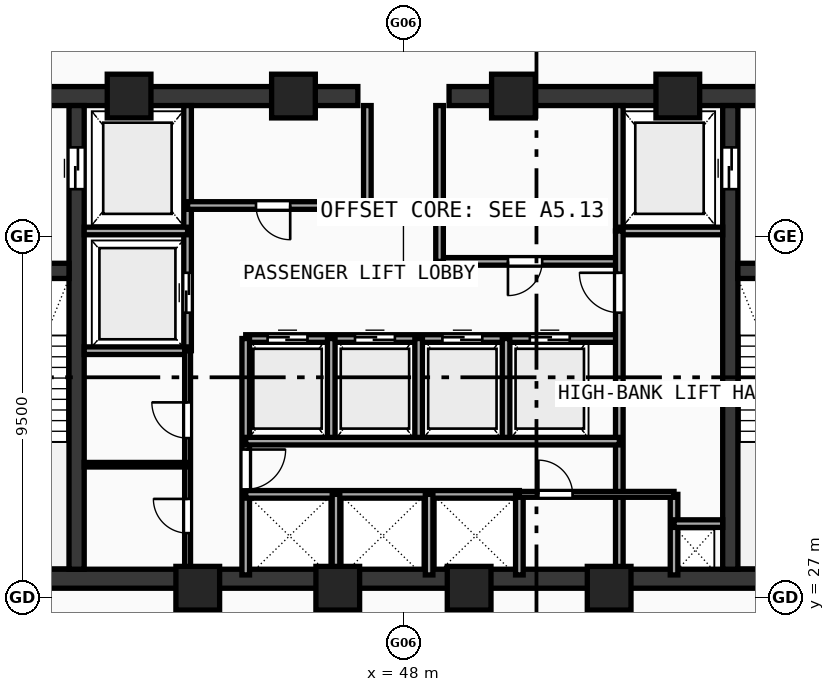
"""IFC4 building model, lengths in metres.
Left out: names, types, materials, properties, quantities, classifications, styles, units other than length and angle.
Written with IfcOpenShell. Run it as: python <this file> out.ifc"""

import sys

from ifc_helpers import new_model, si_unit, direction, frame, frame_2d, origin, origin_with_axes, origin_2d, place, context, subcontext, project, spatial, rectangle, hollow_rectangle, extrude, source, transform, mapped, element, fill, save


model = new_model("IFC4")
c1 = context("Model", 3, precision=1e-05, world=origin(), true_north=direction((0.0, 1.0)))
c2 = subcontext(c1, "Body", "Model", "MODEL_VIEW")
j1 = project(units=[si_unit("LENGTHUNIT", "METRE"), si_unit("PLANEANGLEUNIT", "RADIAN")], contexts=[c1])
p1 = place(None, origin())
s1 = spatial("IfcSite", under=j1, at=p1, CompositionType="ELEMENT")
p2 = place(p1, origin())
s2 = spatial("IfcBuilding", under=s1, at=p2, CompositionType="ELEMENT")
p3 = place(p2, frame((0.0, 0.0, 180.96)))
s3 = spatial("IfcBuildingStorey", under=s2, at=p3, CompositionType="ELEMENT", Elevation=180.96)
p4 = place(p3, frame((35.55, 27.5, 0.0), z_axis=(0.0, 0.0, 1.0), x_axis=(1.0, 0.0, 0.0)))
e1 = element("IfcWall", 1, at=p4, inside=s3, PredefinedType="SHEAR", context=c2, shape_type="SweptSolid", body=[
    extrude(rectangle(XDim=24.9, YDim=0.5, at=frame_2d((12.45, 0.0))), origin(), (0.0, 0.0, 1.0), 3.54),
])
p5 = place(p3, frame((35.55, 40.2, 0.0), z_axis=(0.0, 0.0, 1.0), x_axis=(1.0, 0.0, 0.0)))
e2 = element("IfcWall", 2, at=p5, inside=s3, PredefinedType="SHEAR", context=c2, shape_type="SweptSolid", body=[
    extrude(rectangle(XDim=11.25, YDim=0.5, at=frame_2d((5.625, 0.0))), origin(), (0.0, 0.0, 1.0), 3.54),
])
p6 = place(p5, frame((1.6, 0.0, 0.0)))
e3 = element("IfcOpeningElement", 3, at=p6, cuts=e2, PredefinedType="OPENING", context=c2, shape_type="SweptSolid", body=[
    extrude(rectangle(XDim=1.05, YDim=2.1, at=frame_2d((0.525, 1.05))), frame((0.0, 0.26, 0.0), z_axis=(0.0, -1.0, 0.0), x_axis=(1.0, 0.0, 0.0)), (0.0, 0.0, 1.0), 0.52),
])
p7 = place(p3, frame((49.2, 40.2, 0.0), z_axis=(0.0, 0.0, 1.0), x_axis=(1.0, 0.0, 0.0)))
e4 = element("IfcWall", 4, at=p7, inside=s3, PredefinedType="SHEAR", context=c2, shape_type="SweptSolid", body=[
    extrude(rectangle(XDim=11.25, YDim=0.5, at=frame_2d((5.625, 0.0))), origin(), (0.0, 0.0, 1.0), 3.54),
])
p8 = place(p7, frame((8.6, 0.0, 0.0)))
e5 = element("IfcOpeningElement", 5, at=p8, cuts=e4, PredefinedType="OPENING", context=c2, shape_type="SweptSolid", body=[
    extrude(rectangle(XDim=1.05, YDim=2.1, at=frame_2d((0.525, 1.05))), frame((0.0, 0.26, 0.0), z_axis=(0.0, -1.0, 0.0), x_axis=(1.0, 0.0, 0.0)), (0.0, 0.0, 1.0), 0.52),
])
p9 = place(p3, frame((39.4, 27.75, 0.0), z_axis=(0.0, 0.0, 1.0), x_axis=(0.0, 1.0, 0.0)))
e6 = element("IfcWall", 6, at=p9, inside=s3, PredefinedType="SHEAR", context=c2, shape_type="SweptSolid", body=[
    extrude(rectangle(XDim=12.2, YDim=0.4, at=frame_2d((6.1, 0.0))), origin(), (0.0, 0.0, 1.0), 3.54),
])
p10 = place(p9, frame((10.0, 0.0, 0.0)))
e7 = element("IfcOpeningElement", 7, at=p10, cuts=e6, PredefinedType="OPENING", context=c2, shape_type="SweptSolid", body=[
    extrude(rectangle(XDim=1.1, YDim=2.1, at=frame_2d((0.55, 1.05))), frame((0.0, 0.21, 0.0), z_axis=(0.0, -1.0, 0.0), x_axis=(1.0, 0.0, 0.0)), (0.0, 0.0, 1.0), 0.42),
])
p11 = place(p3, frame((56.6, 27.75, 0.0), z_axis=(0.0, 0.0, 1.0), x_axis=(0.0, 1.0, 0.0)))
e8 = element("IfcWall", 8, at=p11, inside=s3, PredefinedType="SHEAR", context=c2, shape_type="SweptSolid", body=[
    extrude(rectangle(XDim=12.2, YDim=0.4, at=frame_2d((6.1, 0.0))), origin(), (0.0, 0.0, 1.0), 3.54),
])
p12 = place(p11, frame((10.0, 0.0, 0.0)))
e9 = element("IfcOpeningElement", 9, at=p12, cuts=e8, PredefinedType="OPENING", context=c2, shape_type="SweptSolid", body=[
    extrude(rectangle(XDim=1.1, YDim=2.1, at=frame_2d((0.55, 1.05))), frame((0.0, 0.21, 0.0), z_axis=(0.0, -1.0, 0.0), x_axis=(1.0, 0.0, 0.0)), (0.0, 0.0, 1.0), 0.42),
])
p13 = place(p3, frame((36.05, 35.6, 0.0), z_axis=(0.0, 0.0, 1.0), x_axis=(1.0, 0.0, 0.0)))
e10 = element("IfcWall", 10, at=p13, inside=s3, PredefinedType="SHEAR", context=c2, shape_type="SweptSolid", body=[
    extrude(rectangle(XDim=3.15, YDim=0.4, at=frame_2d((1.575, 0.0))), origin(), (0.0, 0.0, 1.0), 3.54),
])
p14 = place(p13, frame((1.07, 0.0, 0.0)))
e11 = element("IfcOpeningElement", 11, at=p14, cuts=e10, PredefinedType="OPENING", context=c2, shape_type="SweptSolid", body=[
    extrude(rectangle(XDim=1.05, YDim=2.1, at=frame_2d((0.525, 1.05))), frame((0.0, 0.21, 0.0), z_axis=(0.0, -1.0, 0.0), x_axis=(1.0, 0.0, 0.0)), (0.0, 0.0, 1.0), 0.42),
])
p15 = place(p3, frame((56.8, 35.6, 0.0), z_axis=(0.0, 0.0, 1.0), x_axis=(1.0, 0.0, 0.0)))
e12 = element("IfcWall", 12, at=p15, inside=s3, PredefinedType="SHEAR", context=c2, shape_type="SweptSolid", body=[
    extrude(rectangle(XDim=3.15, YDim=0.4, at=frame_2d((1.575, 0.0))), origin(), (0.0, 0.0, 1.0), 3.54),
])
p16 = place(p15, frame((1.02, 0.0, 0.0)))
e13 = element("IfcOpeningElement", 13, at=p16, cuts=e12, PredefinedType="OPENING", context=c2, shape_type="SweptSolid", body=[
    extrude(rectangle(XDim=1.05, YDim=2.1, at=frame_2d((0.525, 1.05))), frame((0.0, 0.21, 0.0), z_axis=(0.0, -1.0, 0.0), x_axis=(1.0, 0.0, 0.0)), (0.0, 0.0, 1.0), 0.42),
])
m1 = source(origin(), c2, "Body", "SweptSolid", [
    extrude(hollow_rectangle(XDim=1.15, YDim=1.15, WallThickness=0.048, at=origin_2d()), origin(), (0.0, 0.0, 1.0), 3.8),
])
for number, where, z_axis, x_axis in (
    (14, (42.588, 27.25, -0.26), (0.0, 0.0, 1.0), (1.0, 0.0, 0.0)),
    (15, (46.272, 27.25, -0.26), (0.0, 0.0, 1.0), (1.0, 0.0, 0.0)),
    (16, (49.729, 27.25, -0.26), (0.0, 0.0, 1.0), (1.0, 0.0, 0.0)),
    (17, (53.412, 27.25, -0.26), (0.0, 0.0, 1.0), (1.0, 0.0, 0.0)),
    (18, (55.219, 40.2, -0.26), (0.0, 0.0, 1.0), (1.0, 0.0, 0.0)),
    (19, (50.894, 40.2, -0.26), (0.0, 0.0, 1.0), (1.0, 0.0, 0.0)),
    (20, (45.106, 40.2, -0.26), (0.0, 0.0, 1.0), (1.0, 0.0, 0.0)),
    (21, (40.781, 40.2, -0.26), (0.0, 0.0, 1.0), (1.0, 0.0, 0.0)),
):
    element("IfcColumn", number, at=place(p3, frame(where, z_axis=z_axis, x_axis=x_axis)), inside=s3, PredefinedType="COLUMN", context=c2, shape_type="MappedRepresentation", body=[
        mapped(m1, transform((0.0, 0.0, 0.0), scale=1.0)),
    ])
p17 = place(p3, frame((42.32, 33.5, 0.0), z_axis=(0.0, 0.0, 1.0), x_axis=(0.0, 1.0, 0.0)))
e22 = element("IfcWall", 22, at=p17, inside=s3, PredefinedType="SOLIDWALL", context=c2, shape_type="SweptSolid", body=[
    extrude(rectangle(XDim=6.45, YDim=0.2, at=frame_2d((3.225, 0.0))), origin(), (0.0, 0.0, 1.0), 3.54),
])
p18 = place(p17, frame((1.0, 0.0, 0.0)))
e23 = element("IfcOpeningElement", 23, at=p18, cuts=e22, PredefinedType="OPENING", context=c2, shape_type="SweptSolid", body=[
    extrude(rectangle(XDim=1.05, YDim=2.1, at=frame_2d((0.525, 1.05))), frame((0.0, 0.11, 0.0), z_axis=(0.0, -1.0, 0.0), x_axis=(1.0, 0.0, 0.0)), (0.0, 0.0, 1.0), 0.22),
])
for number, where, z_axis, x_axis in (
    (24, (39.6, 36.65, 0.0), (0.0, 0.0, 1.0), (1.0, 0.0, 0.0)),
    (25, (39.6, 33.5, 0.0), (0.0, 0.0, 1.0), (1.0, 0.0, 0.0)),
):
    element("IfcWall", number, at=place(p3, frame(where, z_axis=z_axis, x_axis=x_axis)), inside=s3, PredefinedType="SOLIDWALL", context=c2, shape_type="SweptSolid", body=[
        extrude(rectangle(XDim=2.72, YDim=0.2, at=frame_2d((1.36, 0.0))), origin(), (0.0, 0.0, 1.0), 3.54),
    ])
p19 = place(p3, frame((53.68, 36.65, 0.0), z_axis=(0.0, 0.0, 1.0), x_axis=(0.0, 1.0, 0.0)))
e26 = element("IfcWall", 26, at=p19, inside=s3, PredefinedType="SOLIDWALL", context=c2, shape_type="SweptSolid", body=[
    extrude(rectangle(XDim=3.3, YDim=0.2, at=frame_2d((1.65, 0.0))), origin(), (0.0, 0.0, 1.0), 3.54),
])
p20 = place(p3, frame((53.68, 36.65, 0.0), z_axis=(0.0, 0.0, 1.0), x_axis=(1.0, 0.0, 0.0)))
e27 = element("IfcWall", 27, at=p20, inside=s3, PredefinedType="SOLIDWALL", context=c2, shape_type="SweptSolid", body=[
    extrude(rectangle(XDim=2.72, YDim=0.2, at=frame_2d((1.36, 0.0))), origin(), (0.0, 0.0, 1.0), 3.54),
])
p21 = place(p3, frame((42.32, 37.32, 0.0), z_axis=(0.0, 0.0, 1.0), x_axis=(1.0, 0.0, 0.0)))
e28 = element("IfcWall", 28, at=p21, inside=s3, PredefinedType="SOLIDWALL", context=c2, shape_type="SweptSolid", body=[
    extrude(rectangle(XDim=4.73, YDim=0.2, at=frame_2d((2.365, 0.0))), origin(), (0.0, 0.0, 1.0), 3.54),
])
p22 = place(p21, frame((1.8, 0.0, 0.0)))
e29 = element("IfcOpeningElement", 29, at=p22, cuts=e28, PredefinedType="OPENING", context=c2, shape_type="SweptSolid", body=[
    extrude(rectangle(XDim=0.9, YDim=2.1, at=frame_2d((0.45, 1.05))), frame((0.0, 0.11, 0.0), z_axis=(0.0, -1.0, 0.0), x_axis=(1.0, 0.0, 0.0)), (0.0, 0.0, 1.0), 0.22),
])
p23 = place(p3, frame((48.95, 35.85, 0.0), z_axis=(0.0, 0.0, 1.0), x_axis=(1.0, 0.0, 0.0)))
e30 = element("IfcWall", 30, at=p23, inside=s3, PredefinedType="SOLIDWALL", context=c2, shape_type="SweptSolid", body=[
    extrude(rectangle(XDim=4.73, YDim=0.2, at=frame_2d((2.365, 0.0))), origin(), (0.0, 0.0, 1.0), 3.54),
])
p24 = place(p23, frame((1.8, 0.0, 0.0)))
e31 = element("IfcOpeningElement", 31, at=p24, cuts=e30, PredefinedType="OPENING", context=c2, shape_type="SweptSolid", body=[
    extrude(rectangle(XDim=0.9, YDim=2.1, at=frame_2d((0.45, 1.05))), frame((0.0, 0.11, 0.0), z_axis=(0.0, -1.0, 0.0), x_axis=(1.0, 0.0, 0.0)), (0.0, 0.0, 1.0), 0.22),
])
p25 = place(p3, frame((47.05, 37.32, 0.0), z_axis=(0.0, 0.0, 1.0), x_axis=(0.0, 1.0, 0.0)))
e32 = element("IfcWall", 32, at=p25, inside=s3, PredefinedType="SOLIDWALL", context=c2, shape_type="SweptSolid", body=[
    extrude(rectangle(XDim=2.63, YDim=0.2, at=frame_2d((1.315, 0.0))), origin(), (0.0, 0.0, 1.0), 3.54),
])
p26 = place(p3, frame((48.95, 35.85, 0.0), z_axis=(0.0, 0.0, 1.0), x_axis=(0.0, 1.0, 0.0)))
e33 = element("IfcWall", 33, at=p26, inside=s3, PredefinedType="SOLIDWALL", context=c2, shape_type="SweptSolid", body=[
    extrude(rectangle(XDim=4.1, YDim=0.2, at=frame_2d((2.05, 0.0))), origin(), (0.0, 0.0, 1.0), 3.54),
])
p27 = place(p3, frame((43.85, 33.82, 0.0), z_axis=(0.0, 0.0, 1.0), x_axis=(1.0, 0.0, 0.0)))
e34 = element("IfcWall", 34, at=p27, inside=s3, PredefinedType="SOLIDWALL", context=c2, shape_type="SweptSolid", body=[
    extrude(rectangle(XDim=9.83, YDim=0.2, at=frame_2d((4.915, 0.0))), origin(), (0.0, 0.0, 1.0), 3.54),
])
p28 = place(p27, frame((0.575, 0.0, 0.0)))
e35 = element("IfcOpeningElement", 35, at=p28, cuts=e34, PredefinedType="OPENING", context=c2, shape_type="SweptSolid", body=[
    extrude(rectangle(XDim=1.05, YDim=2.1, at=frame_2d((0.525, 1.05))), frame((0.0, 0.11, 0.0), z_axis=(0.0, -1.0, 0.0), x_axis=(1.0, 0.0, 0.0)), (0.0, 0.0, 1.0), 0.22),
])
p29 = place(p27, frame((2.875, 0.0, 0.0)))
e36 = element("IfcOpeningElement", 36, at=p29, cuts=e34, PredefinedType="OPENING", context=c2, shape_type="SweptSolid", body=[
    extrude(rectangle(XDim=1.05, YDim=2.1, at=frame_2d((0.525, 1.05))), frame((0.0, 0.11, 0.0), z_axis=(0.0, -1.0, 0.0), x_axis=(1.0, 0.0, 0.0)), (0.0, 0.0, 1.0), 0.22),
])
p30 = place(p27, frame((5.175, 0.0, 0.0)))
e37 = element("IfcOpeningElement", 37, at=p30, cuts=e34, PredefinedType="OPENING", context=c2, shape_type="SweptSolid", body=[
    extrude(rectangle(XDim=1.05, YDim=2.1, at=frame_2d((0.525, 1.05))), frame((0.0, 0.11, 0.0), z_axis=(0.0, -1.0, 0.0), x_axis=(1.0, 0.0, 0.0)), (0.0, 0.0, 1.0), 0.22),
])
p31 = place(p27, frame((7.475, 0.0, 0.0)))
e38 = element("IfcOpeningElement", 38, at=p31, cuts=e34, PredefinedType="OPENING", context=c2, shape_type="SweptSolid", body=[
    extrude(rectangle(XDim=1.05, YDim=2.1, at=frame_2d((0.525, 1.05))), frame((0.0, 0.11, 0.0), z_axis=(0.0, -1.0, 0.0), x_axis=(1.0, 0.0, 0.0)), (0.0, 0.0, 1.0), 0.22),
])
p32 = place(p3, frame((43.85, 27.6, 0.0), z_axis=(0.0, 0.0, 1.0), x_axis=(0.0, 1.0, 0.0)))
e39 = element("IfcWall", 39, at=p32, inside=s3, PredefinedType="SOLIDWALL", context=c2, shape_type="SweptSolid", body=[
    extrude(rectangle(XDim=6.22, YDim=0.2, at=frame_2d((3.11, 0.0))), origin(), (0.0, 0.0, 1.0), 3.54),
])
p33 = place(p32, frame((2.25, 0.0, 0.0)))
e40 = element("IfcOpeningElement", 40, at=p33, cuts=e39, PredefinedType="OPENING", context=c2, shape_type="SweptSolid", body=[
    extrude(rectangle(XDim=1.05, YDim=2.1, at=frame_2d((0.525, 1.05))), frame((0.0, 0.11, 0.0), z_axis=(0.0, -1.0, 0.0), x_axis=(1.0, 0.0, 0.0)), (0.0, 0.0, 1.0), 0.22),
])
p34 = place(p3, frame((53.68, 27.6, 0.0), z_axis=(0.0, 0.0, 1.0), x_axis=(0.0, 1.0, 0.0)))
e41 = element("IfcWall", 41, at=p34, inside=s3, PredefinedType="SOLIDWALL", context=c2, shape_type="SweptSolid", body=[
    extrude(rectangle(XDim=9.05, YDim=0.2, at=frame_2d((4.525, 0.0))), origin(), (0.0, 0.0, 1.0), 3.54),
])
p35 = place(p34, frame((6.9, 0.0, 0.0)))
e42 = element("IfcOpeningElement", 42, at=p35, cuts=e41, PredefinedType="OPENING", context=c2, shape_type="SweptSolid", body=[
    extrude(rectangle(XDim=1.05, YDim=2.1, at=frame_2d((0.525, 1.05))), frame((0.0, 0.11, 0.0), z_axis=(0.0, -1.0, 0.0), x_axis=(1.0, 0.0, 0.0)), (0.0, 0.0, 1.0), 0.22),
])
for number, where, z_axis, x_axis in (
    (43, (46.1, 31.12, 0.0), (0.0, 0.0, 1.0), (0.0, 1.0, 0.0)),
    (44, (48.4, 31.12, 0.0), (0.0, 0.0, 1.0), (0.0, 1.0, 0.0)),
    (45, (50.7, 31.12, 0.0), (0.0, 0.0, 1.0), (0.0, 1.0, 0.0)),
):
    element("IfcWall", number, at=place(p3, frame(where, z_axis=z_axis, x_axis=x_axis)), inside=s3, PredefinedType="SOLIDWALL", context=c2, shape_type="SweptSolid", body=[
        extrude(rectangle(XDim=2.7, YDim=0.2, at=frame_2d((1.35, 0.0))), origin(), (0.0, 0.0, 1.0), 3.54),
    ])
p36 = place(p3, frame((43.85, 29.72, 0.0), z_axis=(0.0, 0.0, 1.0), x_axis=(1.0, 0.0, 0.0)))
e46 = element("IfcWall", 46, at=p36, inside=s3, PredefinedType="SOLIDWALL", context=c2, shape_type="SweptSolid", body=[
    extrude(rectangle(XDim=7.2, YDim=0.2, at=frame_2d((3.6, 0.0))), origin(), (0.0, 0.0, 1.0), 3.54),
])
p37 = place(p3, frame((51.05, 27.6, 0.0), z_axis=(0.0, 0.0, 1.0), x_axis=(0.0, 1.0, 0.0)))
e47 = element("IfcWall", 47, at=p37, inside=s3, PredefinedType="SOLIDWALL", context=c2, shape_type="SweptSolid", body=[
    extrude(rectangle(XDim=2.12, YDim=0.2, at=frame_2d((1.06, 0.0))), origin(), (0.0, 0.0, 1.0), 3.54),
])
p38 = place(p3, frame((43.85, 31.12, 0.0), z_axis=(0.0, 0.0, 1.0), x_axis=(1.0, 0.0, 0.0)))
e48 = element("IfcWall", 48, at=p38, inside=s3, PredefinedType="SOLIDWALL", context=c2, shape_type="SweptSolid", body=[
    extrude(rectangle(XDim=9.83, YDim=0.2, at=frame_2d((4.915, 0.0))), origin(), (0.0, 0.0, 1.0), 3.54),
])
for number, where, z_axis, x_axis in (
    (49, (46.225, 27.6, 0.0), (0.0, 0.0, 1.0), (0.0, 1.0, 0.0)),
    (50, (48.675, 27.6, 0.0), (0.0, 0.0, 1.0), (0.0, 1.0, 0.0)),
    (51, (55.12, 27.6, 0.0), (0.0, 0.0, 1.0), (0.0, 1.0, 0.0)),
):
    element("IfcWall", number, at=place(p3, frame(where, z_axis=z_axis, x_axis=x_axis)), inside=s3, PredefinedType="SOLIDWALL", context=c2, shape_type="SweptSolid", body=[
        extrude(rectangle(XDim=2.12, YDim=0.2, at=frame_2d((1.06, 0.0))), origin(), (0.0, 0.0, 1.0), 3.54),
    ])
p39 = place(p3, frame((55.12, 28.95, 0.0), z_axis=(0.0, 0.0, 1.0), x_axis=(1.0, 0.0, 0.0)))
e52 = element("IfcWall", 52, at=p39, inside=s3, PredefinedType="SOLIDWALL", context=c2, shape_type="SweptSolid", body=[
    extrude(rectangle(XDim=1.28, YDim=0.2, at=frame_2d((0.64, 0.0))), origin(), (0.0, 0.0, 1.0), 3.54),
])
p40 = place(p3, frame((42.32, 27.6, 0.0), z_axis=(0.0, 0.0, 1.0), x_axis=(0.0, 1.0, 0.0)))
e53 = element("IfcWall", 53, at=p40, inside=s3, PredefinedType="PARTITIONING", context=c2, shape_type="SweptSolid", body=[
    extrude(rectangle(XDim=5.9, YDim=0.155, at=frame_2d((2.95, 0.0))), origin(), (0.0, 0.0, 1.0), 3.54),
])
p41 = place(p40, frame((1.1, 0.0, 0.0)))
e54 = element("IfcOpeningElement", 54, at=p41, cuts=e53, PredefinedType="OPENING", context=c2, shape_type="SweptSolid", body=[
    extrude(rectangle(XDim=0.9, YDim=2.1, at=frame_2d((0.45, 1.05))), frame((0.0, 0.087, 0.0), z_axis=(0.0, -1.0, 0.0), x_axis=(1.0, 0.0, 0.0)), (0.0, 0.0, 1.0), 0.175),
])
p42 = place(p40, frame((3.6, 0.0, 0.0)))
e55 = element("IfcOpeningElement", 55, at=p42, cuts=e53, PredefinedType="OPENING", context=c2, shape_type="SweptSolid", body=[
    extrude(rectangle(XDim=0.94, YDim=2.1, at=frame_2d((0.47, 1.05))), frame((0.0, 0.087, 0.0), z_axis=(0.0, -1.0, 0.0), x_axis=(1.0, 0.0, 0.0)), (0.0, 0.0, 1.0), 0.175),
])
p43 = place(p3, frame((51.05, 29.72, 0.0), z_axis=(0.0, 0.0, 1.0), x_axis=(1.0, 0.0, 0.0)))
e56 = element("IfcWall", 56, at=p43, inside=s3, PredefinedType="PARTITIONING", context=c2, shape_type="SweptSolid", body=[
    extrude(rectangle(XDim=4.07, YDim=0.155, at=frame_2d((2.035, 0.0))), origin(), (0.0, 0.0, 1.0), 3.54),
])
p44 = place(p43, frame((0.5, 0.0, 0.0)))
e57 = element("IfcOpeningElement", 57, at=p44, cuts=e56, PredefinedType="OPENING", context=c2, shape_type="SweptSolid", body=[
    extrude(rectangle(XDim=0.9, YDim=2.1, at=frame_2d((0.45, 1.05))), frame((0.0, 0.087, 0.0), z_axis=(0.0, -1.0, 0.0), x_axis=(1.0, 0.0, 0.0)), (0.0, 0.0, 1.0), 0.175),
])
p45 = place(p3, frame((39.6, 30.5, 0.0), z_axis=(0.0, 0.0, 1.0), x_axis=(1.0, 0.0, 0.0)))
e58 = element("IfcWall", 58, at=p45, inside=s3, PredefinedType="PARTITIONING", context=c2, shape_type="SweptSolid", body=[
    extrude(rectangle(XDim=2.72, YDim=0.12, at=frame_2d((1.36, 0.0))), origin(), (0.0, 0.0, 1.0), 3.54),
])
m2 = source(origin(), c2, "Body", "SweptSolid", [
    extrude(rectangle(XDim=1.1, YDim=2.1, at=frame_2d((0.55, 1.05))), frame((0.0, 0.025, 0.0), z_axis=(0.0, -1.0, 0.0), x_axis=(1.0, 0.0, 0.0)), (0.0, 0.0, 1.0), 0.05),
])
p46 = place(p10, frame((1.1, 0.0, 0.0), z_axis=(0.0, 0.0, 1.0), x_axis=(-1.0, 0.0, 0.0)))
e59 = element("IfcDoor", 59, at=p46, inside=s3, OperationType="DOUBLE_DOOR_SLIDING", PredefinedType="DOOR", context=c2, shape_type="MappedRepresentation", body=[
    mapped(m2, transform((0.0, 0.0, 0.0), scale=1.0)),
])
fill(e7, e59)
p47 = place(p12, origin_with_axes())
e60 = element("IfcDoor", 60, at=p47, inside=s3, OperationType="DOUBLE_DOOR_SLIDING", PredefinedType="DOOR", context=c2, shape_type="MappedRepresentation", body=[
    mapped(m2, transform((0.0, 0.0, 0.0), scale=1.0)),
])
fill(e9, e60)
m3 = source(origin(), c2, "Body", "SweptSolid", [
    extrude(rectangle(XDim=1.05, YDim=2.1, at=frame_2d((0.525, 1.05))), frame((0.0, 0.025, 0.0), z_axis=(0.0, -1.0, 0.0), x_axis=(1.0, 0.0, 0.0)), (0.0, 0.0, 1.0), 0.05),
])
p48 = place(p18, origin_with_axes())
e61 = element("IfcDoor", 61, at=p48, inside=s3, OperationType="DOUBLE_DOOR_SLIDING", PredefinedType="DOOR", context=c2, shape_type="MappedRepresentation", body=[
    mapped(m3, transform((0.0, 0.0, 0.0), scale=1.0)),
])
fill(e23, e61)
m4 = source(origin(), c2, "Body", "SweptSolid", [
    extrude(rectangle(XDim=0.9, YDim=2.1, at=frame_2d((0.45, 1.05))), frame((0.0, 0.025, 0.0), z_axis=(0.0, -1.0, 0.0), x_axis=(1.0, 0.0, 0.0)), (0.0, 0.0, 1.0), 0.05),
])
p49 = place(p22, frame((0.9, 0.0, 0.0), z_axis=(0.0, 0.0, 1.0), x_axis=(-1.0, 0.0, 0.0)))
e62 = element("IfcDoor", 62, at=p49, inside=s3, OperationType="SINGLE_SWING_LEFT", PredefinedType="DOOR", context=c2, shape_type="MappedRepresentation", body=[
    mapped(m4, transform((0.0, 0.0, 0.0), scale=1.0)),
])
fill(e29, e62)
p50 = place(p24, frame((0.9, 0.0, 0.0), z_axis=(0.0, 0.0, 1.0), x_axis=(-1.0, 0.0, 0.0)))
e63 = element("IfcDoor", 63, at=p50, inside=s3, OperationType="SINGLE_SWING_RIGHT", PredefinedType="DOOR", context=c2, shape_type="MappedRepresentation", body=[
    mapped(m4, transform((0.0, 0.0, 0.0), scale=1.0)),
])
fill(e31, e63)
p51 = place(p28, origin_with_axes())
e64 = element("IfcDoor", 64, at=p51, inside=s3, OperationType="DOUBLE_DOOR_SLIDING", PredefinedType="DOOR", context=c2, shape_type="MappedRepresentation", body=[
    mapped(m3, transform((0.0, 0.0, 0.0), scale=1.0)),
])
fill(e35, e64)
p52 = place(p29, origin_with_axes())
e65 = element("IfcDoor", 65, at=p52, inside=s3, OperationType="DOUBLE_DOOR_SLIDING", PredefinedType="DOOR", context=c2, shape_type="MappedRepresentation", body=[
    mapped(m3, transform((0.0, 0.0, 0.0), scale=1.0)),
])
fill(e36, e65)
p53 = place(p30, origin_with_axes())
e66 = element("IfcDoor", 66, at=p53, inside=s3, OperationType="DOUBLE_DOOR_SLIDING", PredefinedType="DOOR", context=c2, shape_type="MappedRepresentation", body=[
    mapped(m3, transform((0.0, 0.0, 0.0), scale=1.0)),
])
fill(e37, e66)
p54 = place(p31, origin_with_axes())
e67 = element("IfcDoor", 67, at=p54, inside=s3, OperationType="DOUBLE_DOOR_SLIDING", PredefinedType="DOOR", context=c2, shape_type="MappedRepresentation", body=[
    mapped(m3, transform((0.0, 0.0, 0.0), scale=1.0)),
])
fill(e38, e67)
p55 = place(p33, frame((1.05, 0.0, 0.0), z_axis=(0.0, 0.0, 1.0), x_axis=(-1.0, 0.0, 0.0)))
e68 = element("IfcDoor", 68, at=p55, inside=s3, OperationType="SINGLE_SWING_LEFT", PredefinedType="DOOR", context=c2, shape_type="MappedRepresentation", body=[
    mapped(m3, transform((0.0, 0.0, 0.0), scale=1.0)),
])
fill(e40, e68)
p56 = place(p35, origin_with_axes())
e69 = element("IfcDoor", 69, at=p56, inside=s3, OperationType="SINGLE_SWING_RIGHT", PredefinedType="DOOR", context=c2, shape_type="MappedRepresentation", body=[
    mapped(m3, transform((0.0, 0.0, 0.0), scale=1.0)),
])
fill(e42, e69)
p57 = place(p41, origin_with_axes())
e70 = element("IfcDoor", 70, at=p57, inside=s3, OperationType="SINGLE_SWING_RIGHT", PredefinedType="DOOR", context=c2, shape_type="MappedRepresentation", body=[
    mapped(m4, transform((0.0, 0.0, 0.0), scale=1.0)),
])
fill(e54, e70)
m5 = source(origin(), c2, "Body", "SweptSolid", [
    extrude(rectangle(XDim=0.94, YDim=2.1, at=frame_2d((0.47, 1.05))), frame((0.0, 0.025, 0.0), z_axis=(0.0, -1.0, 0.0), x_axis=(1.0, 0.0, 0.0)), (0.0, 0.0, 1.0), 0.05),
])
p58 = place(p42, origin_with_axes())
e71 = element("IfcDoor", 71, at=p58, inside=s3, OperationType="SINGLE_SWING_RIGHT", PredefinedType="DOOR", context=c2, shape_type="MappedRepresentation", body=[
    mapped(m5, transform((0.0, 0.0, 0.0), scale=1.0)),
])
fill(e55, e71)
p59 = place(p44, origin_with_axes())
e72 = element("IfcDoor", 72, at=p59, inside=s3, OperationType="SINGLE_SWING_LEFT", PredefinedType="DOOR", context=c2, shape_type="MappedRepresentation", body=[
    mapped(m4, transform((0.0, 0.0, 0.0), scale=1.0)),
])
fill(e57, e72)
save(model, sys.argv[1])
